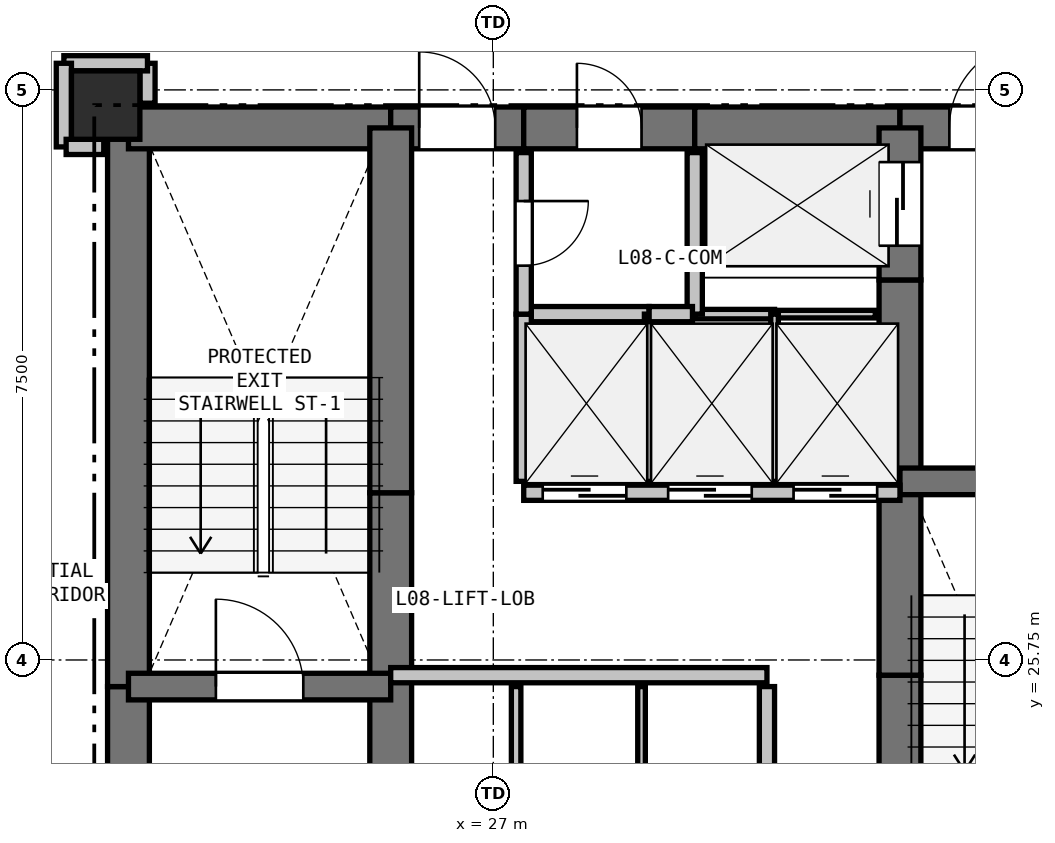
"""IFC4 building model, lengths in metres.
Left out: names, types, materials, properties, quantities, classifications, styles, units other than length and angle.
Written with IfcOpenShell. Run it as: python <this file> out.ifc"""

import sys

from ifc_helpers import new_model, si_unit, direction, frame, frame_2d, origin, origin_2d, place, context, subcontext, project, spatial, rectangle, extrude, element, fill, save


model = new_model("IFC4")
c1 = context("Model", 3, precision=1e-05, world=origin(), true_north=direction((0.0, 1.0)))
c2 = subcontext(c1, "Body", "Model", "MODEL_VIEW")
j1 = project(units=[si_unit("LENGTHUNIT", "METRE"), si_unit("PLANEANGLEUNIT", "RADIAN")], contexts=[c1])
p1 = place(None, origin())
s1 = spatial("IfcSite", under=j1, at=p1, CompositionType="ELEMENT")
p2 = place(p1, origin())
s2 = spatial("IfcBuilding", under=s1, at=p2, CompositionType="ELEMENT")
p3 = place(p2, frame((0.0, 0.0, 32.4)))
s3 = spatial("IfcBuildingStorey", under=s2, at=p3, CompositionType="ELEMENT", Elevation=32.4)
p4 = place(p3, frame((21.9, 33.05, 0.0), z_axis=(0.0, 0.0, 1.0), x_axis=(1.0, 0.0, 0.0)))
e1 = element("IfcColumn", 1, at=p4, inside=s3, PredefinedType="COLUMN", context=c2, shape_type="SweptSolid", body=[
    extrude(rectangle(XDim=0.9, YDim=0.9, at=origin_2d()), origin(), (0.0, 0.0, 1.0), 3.3),
])
p5 = place(p3, frame((22.2, 20.75, 0.0), z_axis=(0.0, 0.0, 1.0), x_axis=(0.0, 1.0, 0.0)))
e2 = element("IfcWall", 2, at=p5, inside=s3, PredefinedType="SHEAR", context=c2, shape_type="SweptSolid", body=[
    extrude(rectangle(XDim=4.65, YDim=0.55, at=frame_2d((2.325, 0.0))), origin(), (0.0, 0.0, 1.0), 3.04),
])
p6 = place(p3, frame((22.2, 25.4, 0.0), z_axis=(0.0, 0.0, 1.0), x_axis=(0.0, 1.0, 0.0)))
e3 = element("IfcWall", 3, at=p6, inside=s3, PredefinedType="SHEAR", context=c2, shape_type="SweptSolid", body=[
    extrude(rectangle(XDim=7.35, YDim=0.55, at=frame_2d((3.675, 0.0))), origin(), (0.0, 0.0, 1.0), 3.04),
])
p7 = place(p3, frame((22.2, 32.75, 0.0), z_axis=(0.0, 0.0, 1.0), x_axis=(1.0, 0.0, 0.0)))
e4 = element("IfcWall", 4, at=p7, inside=s3, PredefinedType="SHEAR", context=c2, shape_type="SweptSolid", body=[
    extrude(rectangle(XDim=3.45, YDim=0.55, at=frame_2d((1.725, 0.0))), origin(), (0.0, 0.0, 1.0), 3.04),
])
p8 = place(p3, frame((25.65, 32.75, 0.0), z_axis=(0.0, 0.0, 1.0), x_axis=(1.0, 0.0, 0.0)))
e5 = element("IfcWall", 5, at=p8, inside=s3, PredefinedType="SHEAR", context=c2, shape_type="SweptSolid", body=[
    extrude(rectangle(XDim=1.75, YDim=0.55, at=frame_2d((0.875, 0.0))), origin(), (0.0, 0.0, 1.0), 3.04),
])
p9 = place(p8, frame((0.375, 0.0, 0.0)))
e6 = element("IfcOpeningElement", 6, at=p9, cuts=e5, PredefinedType="OPENING", context=c2, shape_type="SweptSolid", body=[
    extrude(rectangle(XDim=1.0, YDim=2.15, at=frame_2d((0.5, 1.075))), frame((0.0, 0.285, 0.0), z_axis=(0.0, -1.0, 0.0), x_axis=(1.0, 0.0, 0.0)), (0.0, 0.0, 1.0), 0.57),
])
p10 = place(p3, frame((27.4, 32.75, 0.0), z_axis=(0.0, 0.0, 1.0), x_axis=(1.0, 0.0, 0.0)))
e7 = element("IfcWall", 7, at=p10, inside=s3, PredefinedType="SHEAR", context=c2, shape_type="SweptSolid", body=[
    extrude(rectangle(XDim=2.25, YDim=0.55, at=frame_2d((1.125, 0.0))), origin(), (0.0, 0.0, 1.0), 3.04),
])
p11 = place(p10, frame((0.7, 0.0, 0.0)))
e8 = element("IfcOpeningElement", 8, at=p11, cuts=e7, PredefinedType="OPENING", context=c2, shape_type="SweptSolid", body=[
    extrude(rectangle(XDim=0.85, YDim=2.1, at=frame_2d((0.425, 1.05))), frame((0.0, 0.285, 0.0), z_axis=(0.0, -1.0, 0.0), x_axis=(1.0, 0.0, 0.0)), (0.0, 0.0, 1.0), 0.57),
])
p12 = place(p3, frame((29.65, 32.75, 0.0), z_axis=(0.0, 0.0, 1.0), x_axis=(1.0, 0.0, 0.0)))
e9 = element("IfcWall", 9, at=p12, inside=s3, PredefinedType="SHEAR", context=c2, shape_type="SweptSolid", body=[
    extrude(rectangle(XDim=2.7, YDim=0.55, at=frame_2d((1.35, 0.0))), origin(), (0.0, 0.0, 1.0), 3.04),
])
p13 = place(p3, frame((32.35, 32.75, 0.0), z_axis=(0.0, 0.0, 1.0), x_axis=(1.0, 0.0, 0.0)))
e10 = element("IfcWall", 10, at=p13, inside=s3, PredefinedType="SHEAR", context=c2, shape_type="SweptSolid", body=[
    extrude(rectangle(XDim=3.45, YDim=0.55, at=frame_2d((1.725, 0.0))), origin(), (0.0, 0.0, 1.0), 3.04),
])
p14 = place(p13, frame((0.65, 0.0, 0.0)))
e11 = element("IfcOpeningElement", 11, at=p14, cuts=e10, PredefinedType="OPENING", context=c2, shape_type="SweptSolid", body=[
    extrude(rectangle(XDim=1.15, YDim=2.15, at=frame_2d((0.575, 1.075))), frame((0.0, 0.285, 0.0), z_axis=(0.0, -1.0, 0.0), x_axis=(1.0, 0.0, 0.0)), (0.0, 0.0, 1.0), 0.57),
])
p15 = place(p3, frame((25.65, 22.75, 0.0), z_axis=(0.0, 0.0, 1.0), x_axis=(0.0, 1.0, 0.0)))
e12 = element("IfcWall", 12, at=p15, inside=s3, PredefinedType="SHEAR", context=c2, shape_type="SweptSolid", body=[
    extrude(rectangle(XDim=2.8, YDim=0.55, at=frame_2d((1.4, 0.0))), origin(), (0.0, 0.0, 1.0), 3.04),
])
p16 = place(p3, frame((25.65, 25.55, 0.0), z_axis=(0.0, 0.0, 1.0), x_axis=(0.0, 1.0, 0.0)))
e13 = element("IfcWall", 13, at=p16, inside=s3, PredefinedType="SHEAR", context=c2, shape_type="SweptSolid", body=[
    extrude(rectangle(XDim=2.4, YDim=0.55, at=frame_2d((1.2, 0.0))), origin(), (0.0, 0.0, 1.0), 3.04),
])
for number, where, z_axis, x_axis in (
    (14, (25.65, 27.95, 0.0), (0.0, 0.0, 1.0), (0.0, 1.0, 0.0)),
    (15, (32.35, 20.75, 0.0), (0.0, 0.0, 1.0), (0.0, 1.0, 0.0)),
):
    element("IfcWall", number, at=place(p3, frame(where, z_axis=z_axis, x_axis=x_axis)), inside=s3, PredefinedType="SHEAR", context=c2, shape_type="SweptSolid", body=[
        extrude(rectangle(XDim=4.8, YDim=0.55, at=frame_2d((2.4, 0.0))), origin(), (0.0, 0.0, 1.0), 3.04),
    ])
p17 = place(p3, frame((32.35, 25.55, 0.0), z_axis=(0.0, 0.0, 1.0), x_axis=(0.0, 1.0, 0.0)))
e16 = element("IfcWall", 16, at=p17, inside=s3, PredefinedType="SHEAR", context=c2, shape_type="SweptSolid", body=[
    extrude(rectangle(XDim=2.4, YDim=0.55, at=frame_2d((1.2, 0.0))), origin(), (0.0, 0.0, 1.0), 3.04),
])
p18 = place(p3, frame((32.35, 27.95, 0.0), z_axis=(0.0, 0.0, 1.0), x_axis=(0.0, 1.0, 0.0)))
e17 = element("IfcWall", 17, at=p18, inside=s3, PredefinedType="SHEAR", context=c2, shape_type="SweptSolid", body=[
    extrude(rectangle(XDim=2.8, YDim=0.55, at=frame_2d((1.4, 0.0))), origin(), (0.0, 0.0, 1.0), 3.04),
])
p19 = place(p3, frame((32.35, 30.75, 0.0), z_axis=(0.0, 0.0, 1.0), x_axis=(0.0, 1.0, 0.0)))
e18 = element("IfcWall", 18, at=p19, inside=s3, PredefinedType="SHEAR", context=c2, shape_type="SweptSolid", body=[
    extrude(rectangle(XDim=2.0, YDim=0.55, at=frame_2d((1.0, 0.0))), origin(), (0.0, 0.0, 1.0), 3.04),
])
p20 = place(p19, frame((0.45, 0.0, 0.0)))
e19 = element("IfcOpeningElement", 19, at=p20, cuts=e18, PredefinedType="OPENING", context=c2, shape_type="SweptSolid", body=[
    extrude(rectangle(XDim=1.1, YDim=2.15, at=frame_2d((0.55, 1.075))), frame((0.0, 0.285, 0.0), z_axis=(0.0, -1.0, 0.0), x_axis=(1.0, 0.0, 0.0)), (0.0, 0.0, 1.0), 0.57),
])
p21 = place(p3, frame((22.2, 25.4, 0.0), z_axis=(0.0, 0.0, 1.0), x_axis=(1.0, 0.0, 0.0)))
e20 = element("IfcWall", 20, at=p21, inside=s3, PredefinedType="SHEAR", context=c2, shape_type="SweptSolid", body=[
    extrude(rectangle(XDim=3.45, YDim=0.35, at=frame_2d((1.725, 0.0))), origin(), (0.0, 0.0, 1.0), 3.04),
])
p22 = place(p21, frame((1.15, 0.0, 0.0)))
e21 = element("IfcOpeningElement", 21, at=p22, cuts=e20, PredefinedType="OPENING", context=c2, shape_type="SweptSolid", body=[
    extrude(rectangle(XDim=1.15, YDim=2.15, at=frame_2d((0.575, 1.075))), frame((0.0, 0.185, 0.0), z_axis=(0.0, -1.0, 0.0), x_axis=(1.0, 0.0, 0.0)), (0.0, 0.0, 1.0), 0.37),
])
p23 = place(p3, frame((32.35, 28.1, 0.0), z_axis=(0.0, 0.0, 1.0), x_axis=(1.0, 0.0, 0.0)))
e22 = element("IfcWall", 22, at=p23, inside=s3, PredefinedType="SHEAR", context=c2, shape_type="SweptSolid", body=[
    extrude(rectangle(XDim=3.45, YDim=0.35, at=frame_2d((1.725, 0.0))), origin(), (0.0, 0.0, 1.0), 3.04),
])
p24 = place(p23, frame((1.15, 0.0, 0.0)))
e23 = element("IfcOpeningElement", 23, at=p24, cuts=e22, PredefinedType="OPENING", context=c2, shape_type="SweptSolid", body=[
    extrude(rectangle(XDim=1.15, YDim=2.15, at=frame_2d((0.575, 1.075))), frame((0.0, 0.185, 0.0), z_axis=(0.0, -1.0, 0.0), x_axis=(1.0, 0.0, 0.0)), (0.0, 0.0, 1.0), 0.37),
])
p25 = place(p3, frame((25.65, 25.55, 0.0), z_axis=(0.0, 0.0, 1.0), x_axis=(1.0, 0.0, 0.0)))
e24 = element("IfcWall", 24, at=p25, inside=s3, PredefinedType="PARTITIONING", context=c2, shape_type="SweptSolid", body=[
    extrude(rectangle(XDim=4.95, YDim=0.2, at=frame_2d((2.475, 0.0))), origin(), (0.0, 0.0, 1.0), 3.04),
])
p26 = place(p3, frame((27.4, 27.95, 0.0), z_axis=(0.0, 0.0, 1.0), x_axis=(1.0, 0.0, 0.0)))
e25 = element("IfcWall", 25, at=p26, inside=s3, PredefinedType="PARTITIONING", context=c2, shape_type="SweptSolid", body=[
    extrude(rectangle(XDim=4.95, YDim=0.2, at=frame_2d((2.475, 0.0))), origin(), (0.0, 0.0, 1.0), 3.04),
])
p27 = place(p26, frame((0.25, 0.0, 0.0)))
e26 = element("IfcOpeningElement", 26, at=p27, cuts=e25, PredefinedType="OPENING", context=c2, shape_type="SweptSolid", body=[
    extrude(rectangle(XDim=1.1, YDim=2.15, at=frame_2d((0.55, 1.075))), frame((0.0, 0.11, 0.0), z_axis=(0.0, -1.0, 0.0), x_axis=(1.0, 0.0, 0.0)), (0.0, 0.0, 1.0), 0.22),
])
p28 = place(p26, frame((1.9, 0.0, 0.0)))
e27 = element("IfcOpeningElement", 27, at=p28, cuts=e25, PredefinedType="OPENING", context=c2, shape_type="SweptSolid", body=[
    extrude(rectangle(XDim=1.1, YDim=2.15, at=frame_2d((0.55, 1.075))), frame((0.0, 0.11, 0.0), z_axis=(0.0, -1.0, 0.0), x_axis=(1.0, 0.0, 0.0)), (0.0, 0.0, 1.0), 0.22),
])
p29 = place(p26, frame((3.55, 0.0, 0.0)))
e28 = element("IfcOpeningElement", 28, at=p29, cuts=e25, PredefinedType="OPENING", context=c2, shape_type="SweptSolid", body=[
    extrude(rectangle(XDim=1.1, YDim=2.15, at=frame_2d((0.55, 1.075))), frame((0.0, 0.11, 0.0), z_axis=(0.0, -1.0, 0.0), x_axis=(1.0, 0.0, 0.0)), (0.0, 0.0, 1.0), 0.22),
])
p30 = place(p3, frame((32.025, 30.3, 0.0), z_axis=(0.0, 0.0, 1.0), x_axis=(-1.0, 0.0, 0.0)))
e29 = element("IfcWall", 29, at=p30, inside=s3, PredefinedType="PARTITIONING", context=c2, shape_type="SweptSolid", body=[
    extrude(rectangle(XDim=1.325, YDim=0.1, at=frame_2d((0.663, 0.0))), origin(), (0.0, 0.0, 1.0), 3.04),
])
p31 = place(p3, frame((30.7, 30.3, 0.0), z_axis=(0.0, 0.0, 1.0), x_axis=(-1.0, 0.0, 0.0)))
e30 = element("IfcWall", 30, at=p31, inside=s3, PredefinedType="PARTITIONING", context=c2, shape_type="SweptSolid", body=[
    extrude(rectangle(XDim=1.05, YDim=0.125, at=frame_2d((0.525, 0.0))), origin(), (0.0, 0.0, 1.0), 3.04),
])
p32 = place(p3, frame((29.65, 30.3, 0.0), z_axis=(0.0, 0.0, 1.0), x_axis=(0.0, 1.0, 0.0)))
e31 = element("IfcWall", 31, at=p32, inside=s3, PredefinedType="PARTITIONING", context=c2, shape_type="SweptSolid", body=[
    extrude(rectangle(XDim=2.125, YDim=0.2, at=frame_2d((1.062, 0.0))), origin(), (0.0, 0.0, 1.0), 3.04),
])
p33 = place(p3, frame((27.3, 25.4, 0.0), z_axis=(0.0, 0.0, 1.0), x_axis=(0.0, -1.0, 0.0)))
e32 = element("IfcWall", 32, at=p33, inside=s3, PredefinedType="PARTITIONING", context=c2, shape_type="SweptSolid", body=[
    extrude(rectangle(XDim=2.2, YDim=0.125, at=frame_2d((1.1, 0.0))), origin(), (0.0, 0.0, 1.0), 3.04),
])
p34 = place(p3, frame((28.95, 25.4, 0.0), z_axis=(0.0, 0.0, 1.0), x_axis=(0.0, -1.0, 0.0)))
e33 = element("IfcWall", 33, at=p34, inside=s3, PredefinedType="PARTITIONING", context=c2, shape_type="SweptSolid", body=[
    extrude(rectangle(XDim=2.2, YDim=0.1, at=frame_2d((1.1, 0.0))), origin(), (0.0, 0.0, 1.0), 3.04),
])
p35 = place(p3, frame((30.6, 25.4, 0.0), z_axis=(0.0, 0.0, 1.0), x_axis=(0.0, -1.0, 0.0)))
e34 = element("IfcWall", 34, at=p35, inside=s3, PredefinedType="PARTITIONING", context=c2, shape_type="SweptSolid", body=[
    extrude(rectangle(XDim=2.2, YDim=0.2, at=frame_2d((1.1, 0.0))), origin(), (0.0, 0.0, 1.0), 3.04),
])
p36 = place(p3, frame((27.4, 30.3, 0.0), z_axis=(0.0, 0.0, 1.0), x_axis=(1.0, 0.0, 0.0)))
e35 = element("IfcWall", 35, at=p36, inside=s3, PredefinedType="PARTITIONING", context=c2, shape_type="SweptSolid", body=[
    extrude(rectangle(XDim=1.65, YDim=0.2, at=frame_2d((0.825, 0.0))), origin(), (0.0, 0.0, 1.0), 3.04),
])
p37 = place(p3, frame((29.05, 30.3, 0.0), z_axis=(0.0, 0.0, 1.0), x_axis=(0.0, -1.0, 0.0)))
e36 = element("IfcWall", 36, at=p37, inside=s3, PredefinedType="PARTITIONING", context=c2, shape_type="SweptSolid", body=[
    extrude(rectangle(XDim=2.2, YDim=0.125, at=frame_2d((1.1, 0.0))), origin(), (0.0, 0.0, 1.0), 3.04),
])
p38 = place(p3, frame((27.4, 28.1, 0.0), z_axis=(0.0, 0.0, 1.0), x_axis=(0.0, 1.0, 0.0)))
e37 = element("IfcWall", 37, at=p38, inside=s3, PredefinedType="PARTITIONING", context=c2, shape_type="SweptSolid", body=[
    extrude(rectangle(XDim=2.2, YDim=0.2, at=frame_2d((1.1, 0.0))), origin(), (0.0, 0.0, 1.0), 3.04),
])
p39 = place(p3, frame((29.05, 30.3, 0.0), z_axis=(0.0, 0.0, 1.0), x_axis=(1.0, 0.0, 0.0)))
e38 = element("IfcWall", 38, at=p39, inside=s3, PredefinedType="PARTITIONING", context=c2, shape_type="SweptSolid", body=[
    extrude(rectangle(XDim=0.57, YDim=0.2, at=frame_2d((0.285, 0.0))), origin(), (0.0, 0.0, 1.0), 3.04),
])
p40 = place(p3, frame((30.7, 30.3, 0.0), z_axis=(0.0, 0.0, 1.0), x_axis=(0.0, -1.0, 0.0)))
e39 = element("IfcWall", 39, at=p40, inside=s3, PredefinedType="PARTITIONING", context=c2, shape_type="SweptSolid", body=[
    extrude(rectangle(XDim=2.2, YDim=0.1, at=frame_2d((1.1, 0.0))), origin(), (0.0, 0.0, 1.0), 3.04),
])
p41 = place(p3, frame((27.4, 32.425, 0.0), z_axis=(0.0, 0.0, 1.0), x_axis=(0.0, -1.0, 0.0)))
e40 = element("IfcWall", 40, at=p41, inside=s3, PredefinedType="PARTITIONING", context=c2, shape_type="SweptSolid", body=[
    extrude(rectangle(XDim=2.125, YDim=0.2, at=frame_2d((1.062, 0.0))), origin(), (0.0, 0.0, 1.0), 3.04),
])
p42 = place(p41, frame((0.637, 0.0, 0.0)))
e41 = element("IfcOpeningElement", 41, at=p42, cuts=e40, PredefinedType="OPENING", context=c2, shape_type="SweptSolid", body=[
    extrude(rectangle(XDim=0.85, YDim=2.1, at=frame_2d((0.425, 1.05))), frame((0.0, 0.11, 0.0), z_axis=(0.0, -1.0, 0.0), x_axis=(1.0, 0.0, 0.0)), (0.0, 0.0, 1.0), 0.22),
])
p43 = place(p3, frame((22.45, 33.075, 0.0), z_axis=(0.0, 0.0, 1.0), x_axis=(0.0, 1.0, 0.0)))
e42 = element("IfcWall", 42, at=p43, inside=s3, PredefinedType="PARTITIONING", context=c2, shape_type="SweptSolid", body=[
    extrude(rectangle(XDim=0.525, YDim=0.2, at=frame_2d((0.263, 0.0))), origin(), (0.0, 0.0, 1.0), 2.488),
])
p44 = place(p3, frame((22.45, 33.6, 0.0), z_axis=(0.0, 0.0, 1.0), x_axis=(-1.0, 0.0, 0.0)))
e43 = element("IfcWall", 43, at=p44, inside=s3, PredefinedType="PARTITIONING", context=c2, shape_type="SweptSolid", body=[
    extrude(rectangle(XDim=1.1, YDim=0.2, at=frame_2d((0.55, 0.0))), origin(), (0.0, 0.0, 1.0), 3.04),
])
p45 = place(p3, frame((21.35, 33.6, 0.0), z_axis=(0.0, 0.0, 1.0), x_axis=(0.0, -1.0, 0.0)))
e44 = element("IfcWall", 44, at=p45, inside=s3, PredefinedType="PARTITIONING", context=c2, shape_type="SweptSolid", body=[
    extrude(rectangle(XDim=1.1, YDim=0.2, at=frame_2d((0.55, 0.0))), origin(), (0.0, 0.0, 1.0), 2.338),
])
p46 = place(p3, frame((21.38, 32.5, 0.0), z_axis=(0.0, 0.0, 1.0), x_axis=(1.0, 0.0, 0.0)))
e45 = element("IfcWall", 45, at=p46, inside=s3, PredefinedType="PARTITIONING", context=c2, shape_type="SweptSolid", body=[
    extrude(rectangle(XDim=0.495, YDim=0.2, at=frame_2d((0.248, 0.0))), origin(), (0.0, 0.0, 1.0), 2.488),
])
p47 = place(p27, origin())
e46 = element("IfcDoor", 46, at=p47, inside=s3, OperationType="SLIDING_TO_LEFT", PredefinedType="DOOR", context=c2, shape_type="SweptSolid", body=[
    extrude(rectangle(XDim=1.1, YDim=2.15, at=frame_2d((0.55, 1.075))), frame((0.0, 0.025, 0.0), z_axis=(0.0, -1.0, 0.0), x_axis=(1.0, 0.0, 0.0)), (0.0, 0.0, 1.0), 0.05),
])
fill(e26, e46)
p48 = place(p28, origin())
e47 = element("IfcDoor", 47, at=p48, inside=s3, OperationType="SLIDING_TO_LEFT", PredefinedType="DOOR", context=c2, shape_type="SweptSolid", body=[
    extrude(rectangle(XDim=1.1, YDim=2.15, at=frame_2d((0.55, 1.075))), frame((0.0, 0.025, 0.0), z_axis=(0.0, -1.0, 0.0), x_axis=(1.0, 0.0, 0.0)), (0.0, 0.0, 1.0), 0.05),
])
fill(e27, e47)
p49 = place(p29, origin())
e48 = element("IfcDoor", 48, at=p49, inside=s3, OperationType="SLIDING_TO_LEFT", PredefinedType="DOOR", context=c2, shape_type="SweptSolid", body=[
    extrude(rectangle(XDim=1.1, YDim=2.15, at=frame_2d((0.55, 1.075))), frame((0.0, 0.025, 0.0), z_axis=(0.0, -1.0, 0.0), x_axis=(1.0, 0.0, 0.0)), (0.0, 0.0, 1.0), 0.05),
])
fill(e28, e48)
p50 = place(p9, origin())
e49 = element("IfcDoor", 49, at=p50, inside=s3, OperationType="SINGLE_SWING_LEFT", PredefinedType="DOOR", context=c2, shape_type="SweptSolid", body=[
    extrude(rectangle(XDim=1.0, YDim=2.15, at=frame_2d((0.5, 1.075))), frame((0.0, 0.025, 0.0), z_axis=(0.0, -1.0, 0.0), x_axis=(1.0, 0.0, 0.0)), (0.0, 0.0, 1.0), 0.05),
])
fill(e6, e49)
p51 = place(p20, origin())
e50 = element("IfcDoor", 50, at=p51, inside=s3, OperationType="SLIDING_TO_LEFT", PredefinedType="DOOR", context=c2, shape_type="SweptSolid", body=[
    extrude(rectangle(XDim=1.1, YDim=2.15, at=frame_2d((0.55, 1.075))), frame((0.0, 0.025, 0.0), z_axis=(0.0, -1.0, 0.0), x_axis=(1.0, 0.0, 0.0)), (0.0, 0.0, 1.0), 0.05),
])
fill(e19, e50)
p52 = place(p22, origin())
e51 = element("IfcDoor", 51, at=p52, inside=s3, OperationType="SINGLE_SWING_LEFT", PredefinedType="DOOR", context=c2, shape_type="SweptSolid", body=[
    extrude(rectangle(XDim=1.15, YDim=2.15, at=frame_2d((0.575, 1.075))), frame((0.0, 0.025, 0.0), z_axis=(0.0, -1.0, 0.0), x_axis=(1.0, 0.0, 0.0)), (0.0, 0.0, 1.0), 0.05),
])
fill(e21, e51)
p53 = place(p14, origin())
e52 = element("IfcDoor", 52, at=p53, inside=s3, OperationType="SINGLE_SWING_RIGHT", PredefinedType="DOOR", context=c2, shape_type="SweptSolid", body=[
    extrude(rectangle(XDim=1.15, YDim=2.15, at=frame_2d((0.575, 1.075))), frame((0.0, 0.025, 0.0), z_axis=(0.0, -1.0, 0.0), x_axis=(1.0, 0.0, 0.0)), (0.0, 0.0, 1.0), 0.05),
])
fill(e11, e52)
p54 = place(p42, origin())
e53 = element("IfcDoor", 53, at=p54, inside=s3, OperationType="SINGLE_SWING_LEFT", PredefinedType="DOOR", context=c2, shape_type="SweptSolid", body=[
    extrude(rectangle(XDim=0.85, YDim=2.1, at=frame_2d((0.425, 1.05))), frame((0.0, 0.025, 0.0), z_axis=(0.0, -1.0, 0.0), x_axis=(1.0, 0.0, 0.0)), (0.0, 0.0, 1.0), 0.05),
])
fill(e41, e53)
p55 = place(p11, origin())
e54 = element("IfcDoor", 54, at=p55, inside=s3, OperationType="SINGLE_SWING_LEFT", PredefinedType="DOOR", context=c2, shape_type="SweptSolid", body=[
    extrude(rectangle(XDim=0.85, YDim=2.1, at=frame_2d((0.425, 1.05))), frame((0.0, 0.025, 0.0), z_axis=(0.0, -1.0, 0.0), x_axis=(1.0, 0.0, 0.0)), (0.0, 0.0, 1.0), 0.05),
])
fill(e8, e54)
save(model, sys.argv[1])
